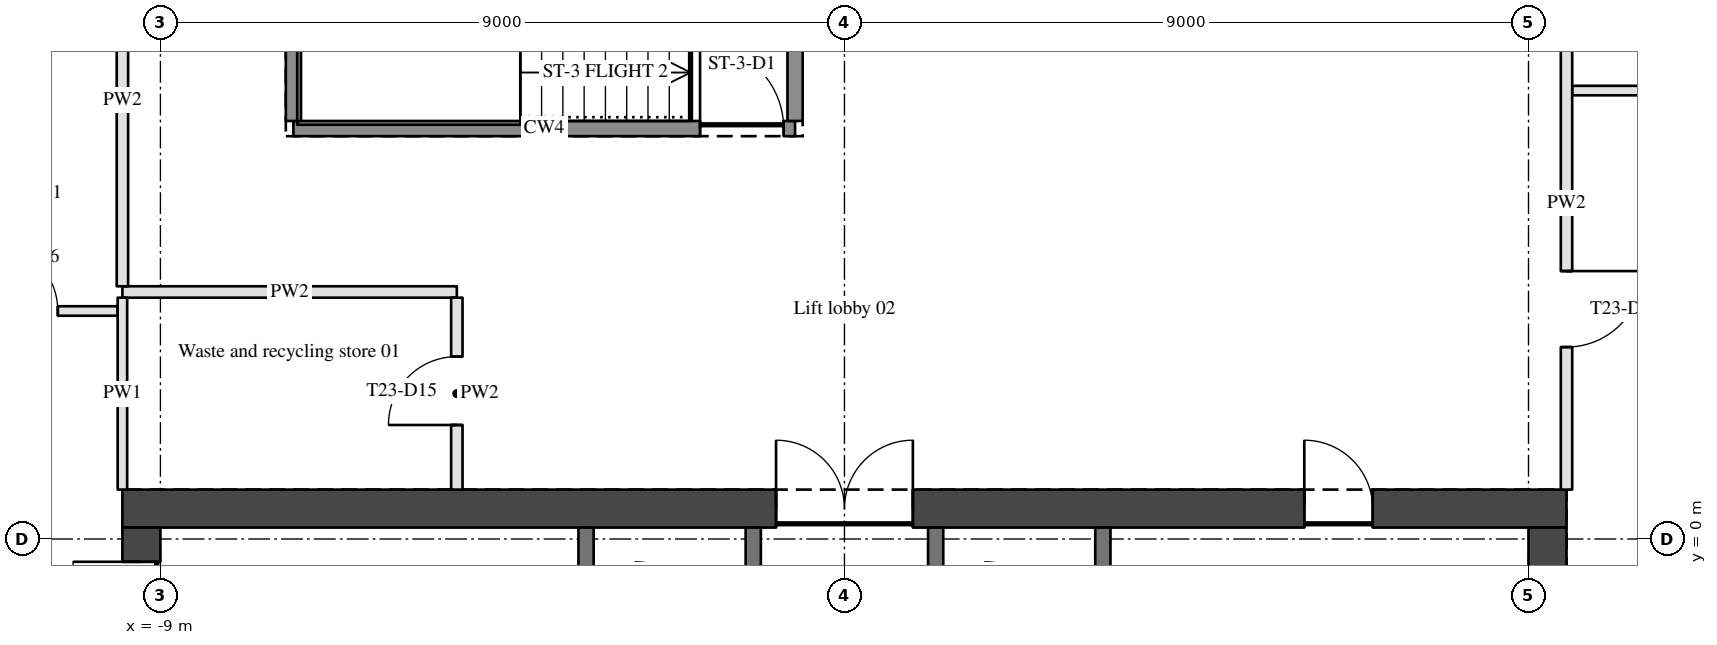
"""IFC4 building model, lengths in metres.
Left out: names, types, materials, properties, quantities, classifications, styles, units other than length and angle.
Written with IfcOpenShell. Run it as: python <this file> out.ifc"""

import sys

from ifc_helpers import new_model, si_unit, direction, frame, frame_2d, origin, place, context, subcontext, project, spatial, rectangle, extrude, element, fill, save


model = new_model("IFC4")
c1 = context("Model", 3, precision=1e-05, world=origin(), true_north=direction((0.0, 1.0)))
c2 = subcontext(c1, "Body", "Model", "MODEL_VIEW")
j1 = project(units=[si_unit("LENGTHUNIT", "METRE"), si_unit("PLANEANGLEUNIT", "RADIAN")], contexts=[c1])
p1 = place(None, origin())
s1 = spatial("IfcSite", under=j1, at=p1, CompositionType="ELEMENT")
p2 = place(p1, origin())
s2 = spatial("IfcBuilding", under=s1, at=p2, CompositionType="ELEMENT")
p3 = place(p2, frame((0.0, 0.0, 294.15)))
s3 = spatial("IfcBuildingStorey", under=s2, at=p3, CompositionType="ELEMENT", Elevation=294.15)
p4 = place(p3, frame((-9.5, 0.4, 0.0), z_axis=(0.0, 0.0, 1.0), x_axis=(1.0, 0.0, 0.0)))
e1 = element("IfcWall", 1, at=p4, inside=s3, PredefinedType="SHEAR", context=c2, shape_type="SweptSolid", body=[
    extrude(rectangle(XDim=19.0, YDim=0.5, at=frame_2d((9.5, 0.0))), origin(), (0.0, 0.0, 1.0), 3.15),
])
p5 = place(p4, frame((8.6, 0.0, 0.0)))
e2 = element("IfcOpeningElement", 2, at=p5, cuts=e1, PredefinedType="OPENING", context=c2, shape_type="SweptSolid", body=[
    extrude(rectangle(XDim=1.8, YDim=2.1, at=frame_2d((0.9, 1.05))), frame((0.0, 0.26, 0.0), z_axis=(0.0, -1.0, 0.0), x_axis=(1.0, 0.0, 0.0)), (0.0, 0.0, 1.0), 0.52),
])
p6 = place(p4, frame((15.55, 0.0, 0.0)))
e3 = element("IfcOpeningElement", 3, at=p6, cuts=e1, PredefinedType="OPENING", context=c2, shape_type="SweptSolid", body=[
    extrude(rectangle(XDim=0.9, YDim=2.1, at=frame_2d((0.45, 1.05))), frame((0.0, 0.26, 0.0), z_axis=(0.0, -1.0, 0.0), x_axis=(1.0, 0.0, 0.0)), (0.0, 0.0, 1.0), 0.52),
])
p7 = place(p3, frame((-9.25, -11.5, 0.0), z_axis=(0.0, 0.0, 1.0), x_axis=(0.0, 1.0, 0.0)))
e4 = element("IfcWall", 4, at=p7, inside=s3, PredefinedType="SHEAR", context=c2, shape_type="SweptSolid", body=[
    extrude(rectangle(XDim=11.65, YDim=0.5, at=frame_2d((5.825, 0.0))), origin(), (0.0, 0.0, 1.0), 3.15),
])
p8 = place(p7, frame((9.4, 0.0, 0.0)))
e5 = element("IfcOpeningElement", 5, at=p8, cuts=e4, PredefinedType="OPENING", context=c2, shape_type="SweptSolid", body=[
    extrude(rectangle(XDim=1.8, YDim=2.1, at=frame_2d((0.9, 1.05))), frame((0.0, 0.26, 0.0), z_axis=(0.0, -1.0, 0.0), x_axis=(1.0, 0.0, 0.0)), (0.0, 0.0, 1.0), 0.52),
])
p9 = place(p3, frame((9.25, -11.5, 0.0), z_axis=(0.0, 0.0, 1.0), x_axis=(0.0, 1.0, 0.0)))
e6 = element("IfcWall", 6, at=p9, inside=s3, PredefinedType="SHEAR", context=c2, shape_type="SweptSolid", body=[
    extrude(rectangle(XDim=11.65, YDim=0.5, at=frame_2d((5.825, 0.0))), origin(), (0.0, 0.0, 1.0), 3.15),
])
p10 = place(p3, frame((-12.1, 3.0, 0.0), z_axis=(0.0, 0.0, 1.0), x_axis=(1.0, 0.0, 0.0)))
e7 = element("IfcWall", 7, at=p10, inside=s3, PredefinedType="PARTITIONING", context=c2, shape_type="SweptSolid", body=[
    extrude(rectangle(XDim=2.538, YDim=0.125, at=frame_2d((1.269, 0.0))), origin(), (0.0, 0.0, 1.0), 2.21),
])
p11 = place(p10, frame((0.85, 0.0, 0.0)))
e8 = element("IfcOpeningElement", 8, at=p11, cuts=e7, PredefinedType="OPENING", context=c2, shape_type="SweptSolid", body=[
    extrude(rectangle(XDim=0.9, YDim=2.1, at=frame_2d((0.45, 1.05))), frame((0.0, 0.073, 0.0), z_axis=(0.0, -1.0, 0.0), x_axis=(1.0, 0.0, 0.0)), (0.0, 0.0, 1.0), 0.145),
])
p12 = place(p3, frame((-9.5, 3.25, 0.0), z_axis=(0.0, 0.0, 1.0), x_axis=(1.0, 0.0, 0.0)))
e9 = element("IfcWall", 9, at=p12, inside=s3, PredefinedType="PARTITIONING", context=c2, shape_type="SweptSolid", body=[
    extrude(rectangle(XDim=4.4, YDim=0.15, at=frame_2d((2.2, 0.0))), origin(), (0.0, 0.0, 1.0), 2.21),
])
p13 = place(p3, frame((-7.25, 5.4, 0.0), z_axis=(0.0, 0.0, 1.0), x_axis=(1.0, 0.0, 0.0)))
e10 = element("IfcWall", 10, at=p13, inside=s3, PredefinedType="SHEAR", context=c2, shape_type="SweptSolid", body=[
    extrude(rectangle(XDim=6.6, YDim=0.2, at=frame_2d((3.3, 0.0))), origin(), (0.0, 0.0, 1.0), 3.15),
])
p14 = place(p13, frame((5.35, 0.0, 0.0)))
e11 = element("IfcOpeningElement", 11, at=p14, cuts=e10, PredefinedType="OPENING", context=c2, shape_type="SweptSolid", body=[
    extrude(rectangle(XDim=1.1, YDim=2.1, at=frame_2d((0.55, 1.05))), frame((0.0, 0.11, 0.0), z_axis=(0.0, -1.0, 0.0), x_axis=(1.0, 0.0, 0.0)), (0.0, 0.0, 1.0), 0.22),
])
p15 = place(p3, frame((9.575, 5.9, 0.0), z_axis=(0.0, 0.0, 1.0), x_axis=(1.0, 0.0, 0.0)))
e12 = element("IfcWall", 12, at=p15, inside=s3, PredefinedType="PARTITIONING", context=c2, shape_type="SweptSolid", body=[
    extrude(rectangle(XDim=2.925, YDim=0.125, at=frame_2d((1.462, 0.0))), origin(), (0.0, 0.0, 1.0), 2.21),
])
p16 = place(p15, frame((0.975, 0.0, 0.0)))
e13 = element("IfcOpeningElement", 13, at=p16, cuts=e12, PredefinedType="OPENING", context=c2, shape_type="SweptSolid", body=[
    extrude(rectangle(XDim=0.9, YDim=2.1, at=frame_2d((0.45, 1.05))), frame((0.0, 0.073, 0.0), z_axis=(0.0, -1.0, 0.0), x_axis=(1.0, 0.0, 0.0)), (0.0, 0.0, 1.0), 0.145),
])
p17 = place(p3, frame((-9.5, 0.65, 0.0), z_axis=(0.0, 0.0, 1.0), x_axis=(0.0, 1.0, 0.0)))
e14 = element("IfcWall", 14, at=p17, inside=s3, PredefinedType="PARTITIONING", context=c2, shape_type="SweptSolid", body=[
    extrude(rectangle(XDim=2.525, YDim=0.125, at=frame_2d((1.263, 0.0))), origin(), (0.0, 0.0, 1.0), 2.21),
])
p18 = place(p3, frame((-9.5, 3.325, 0.0), z_axis=(0.0, 0.0, 1.0), x_axis=(0.0, 1.0, 0.0)))
e15 = element("IfcWall", 15, at=p18, inside=s3, PredefinedType="PARTITIONING", context=c2, shape_type="SweptSolid", body=[
    extrude(rectangle(XDim=4.9, YDim=0.15, at=frame_2d((2.45, 0.0))), origin(), (0.0, 0.0, 1.0), 2.21),
])
p19 = place(p3, frame((-7.25, 5.5, 0.0), z_axis=(0.0, 0.0, 1.0), x_axis=(0.0, 1.0, 0.0)))
e16 = element("IfcWall", 16, at=p19, inside=s3, PredefinedType="SHEAR", context=c2, shape_type="SweptSolid", body=[
    extrude(rectangle(XDim=2.7, YDim=0.2, at=frame_2d((1.35, 0.0))), origin(), (0.0, 0.0, 1.0), 3.15),
])
p20 = place(p3, frame((-5.1, 0.65, 0.0), z_axis=(0.0, 0.0, 1.0), x_axis=(0.0, 1.0, 0.0)))
e17 = element("IfcWall", 17, at=p20, inside=s3, PredefinedType="PARTITIONING", context=c2, shape_type="SweptSolid", body=[
    extrude(rectangle(XDim=2.525, YDim=0.15, at=frame_2d((1.263, 0.0))), origin(), (0.0, 0.0, 1.0), 2.21),
])
p21 = place(p20, frame((0.85, 0.0, 0.0)))
e18 = element("IfcOpeningElement", 18, at=p21, cuts=e17, PredefinedType="OPENING", context=c2, shape_type="SweptSolid", body=[
    extrude(rectangle(XDim=0.9, YDim=2.1, at=frame_2d((0.45, 1.05))), frame((0.0, 0.085, 0.0), z_axis=(0.0, -1.0, 0.0), x_axis=(1.0, 0.0, 0.0)), (0.0, 0.0, 1.0), 0.17),
])
for number, where, z_axis, x_axis in (
    (19, (-3.4, -1.1, 0.0), (0.0, 0.0, 1.0), (0.0, 1.0, 0.0)),
    (20, (-1.2, -1.1, 0.0), (0.0, 0.0, 1.0), (0.0, 1.0, 0.0)),
):
    element("IfcWall", number, at=place(p3, frame(where, z_axis=z_axis, x_axis=x_axis)), inside=s3, PredefinedType="SOLIDWALL", context=c2, shape_type="SweptSolid", body=[
        extrude(rectangle(XDim=1.25, YDim=0.2, at=frame_2d((0.625, 0.0))), origin(), (0.0, 0.0, 1.0), 2.85),
    ])
p22 = place(p3, frame((-0.65, 5.5, 0.0), z_axis=(0.0, 0.0, 1.0), x_axis=(0.0, 1.0, 0.0)))
e21 = element("IfcWall", 21, at=p22, inside=s3, PredefinedType="SHEAR", context=c2, shape_type="SweptSolid", body=[
    extrude(rectangle(XDim=2.7, YDim=0.2, at=frame_2d((1.35, 0.0))), origin(), (0.0, 0.0, 1.0), 3.15),
])
for number, where, z_axis, x_axis in (
    (22, (1.2, -1.1, 0.0), (0.0, 0.0, 1.0), (0.0, 1.0, 0.0)),
    (23, (3.4, -1.1, 0.0), (0.0, 0.0, 1.0), (0.0, 1.0, 0.0)),
):
    element("IfcWall", number, at=place(p3, frame(where, z_axis=z_axis, x_axis=x_axis)), inside=s3, PredefinedType="SOLIDWALL", context=c2, shape_type="SweptSolid", body=[
        extrude(rectangle(XDim=1.25, YDim=0.2, at=frame_2d((0.625, 0.0))), origin(), (0.0, 0.0, 1.0), 2.85),
    ])
p23 = place(p3, frame((9.5, 8.2, 0.0), z_axis=(0.0, 0.0, 1.0), x_axis=(0.0, -1.0, 0.0)))
e24 = element("IfcWall", 24, at=p23, inside=s3, PredefinedType="PARTITIONING", context=c2, shape_type="SweptSolid", body=[
    extrude(rectangle(XDim=7.55, YDim=0.15, at=frame_2d((3.775, 0.0))), origin(), (0.0, 0.0, 1.0), 2.21),
])
p24 = place(p23, frame((4.675, 0.0, 0.0)))
e25 = element("IfcOpeningElement", 25, at=p24, cuts=e24, PredefinedType="OPENING", context=c2, shape_type="SweptSolid", body=[
    extrude(rectangle(XDim=1.0, YDim=2.1, at=frame_2d((0.5, 1.05))), frame((0.0, 0.085, 0.0), z_axis=(0.0, -1.0, 0.0), x_axis=(1.0, 0.0, 0.0)), (0.0, 0.0, 1.0), 0.17),
])
p25 = place(p24, origin())
e26 = element("IfcDoor", 26, at=p25, inside=s3, OperationType="SINGLE_SWING_LEFT", PredefinedType="DOOR", context=c2, shape_type="SweptSolid", body=[
    extrude(rectangle(XDim=1.0, YDim=2.1, at=frame_2d((0.5, 1.05))), frame((0.0, 0.025, 0.0), z_axis=(0.0, -1.0, 0.0), x_axis=(1.0, 0.0, 0.0)), (0.0, 0.0, 1.0), 0.05),
])
fill(e25, e26)
p26 = place(p5, origin())
e27 = element("IfcDoor", 27, at=p26, inside=s3, OperationType="DOUBLE_DOOR_SINGLE_SWING", PredefinedType="DOOR", context=c2, shape_type="SweptSolid", body=[
    extrude(rectangle(XDim=1.8, YDim=2.1, at=frame_2d((0.9, 1.05))), frame((0.0, 0.025, 0.0), z_axis=(0.0, -1.0, 0.0), x_axis=(1.0, 0.0, 0.0)), (0.0, 0.0, 1.0), 0.05),
])
fill(e2, e27)
p27 = place(p8, origin())
e28 = element("IfcDoor", 28, at=p27, inside=s3, OperationType="DOUBLE_DOOR_SINGLE_SWING", PredefinedType="DOOR", context=c2, shape_type="SweptSolid", body=[
    extrude(rectangle(XDim=1.8, YDim=2.1, at=frame_2d((0.9, 1.05))), frame((0.0, 0.025, 0.0), z_axis=(0.0, -1.0, 0.0), x_axis=(1.0, 0.0, 0.0)), (0.0, 0.0, 1.0), 0.05),
])
fill(e5, e28)
p28 = place(p14, origin())
e29 = element("IfcDoor", 29, at=p28, inside=s3, OperationType="SINGLE_SWING_LEFT", PredefinedType="DOOR", context=c2, shape_type="SweptSolid", body=[
    extrude(rectangle(XDim=1.1, YDim=2.1, at=frame_2d((0.55, 1.05))), frame((0.0, 0.025, 0.0), z_axis=(0.0, -1.0, 0.0), x_axis=(1.0, 0.0, 0.0)), (0.0, 0.0, 1.0), 0.05),
])
fill(e11, e29)
p29 = place(p6, origin())
e30 = element("IfcDoor", 30, at=p29, inside=s3, OperationType="SINGLE_SWING_LEFT", PredefinedType="DOOR", context=c2, shape_type="SweptSolid", body=[
    extrude(rectangle(XDim=0.9, YDim=2.1, at=frame_2d((0.45, 1.05))), frame((0.0, 0.025, 0.0), z_axis=(0.0, -1.0, 0.0), x_axis=(1.0, 0.0, 0.0)), (0.0, 0.0, 1.0), 0.05),
])
fill(e3, e30)
p30 = place(p21, origin())
e31 = element("IfcDoor", 31, at=p30, inside=s3, OperationType="SINGLE_SWING_LEFT", PredefinedType="DOOR", context=c2, shape_type="SweptSolid", body=[
    extrude(rectangle(XDim=0.9, YDim=2.1, at=frame_2d((0.45, 1.05))), frame((0.0, 0.025, 0.0), z_axis=(0.0, -1.0, 0.0), x_axis=(1.0, 0.0, 0.0)), (0.0, 0.0, 1.0), 0.05),
])
fill(e18, e31)
p31 = place(p11, origin())
e32 = element("IfcDoor", 32, at=p31, inside=s3, OperationType="SINGLE_SWING_LEFT", PredefinedType="DOOR", context=c2, shape_type="SweptSolid", body=[
    extrude(rectangle(XDim=0.9, YDim=2.1, at=frame_2d((0.45, 1.05))), frame((0.0, 0.025, 0.0), z_axis=(0.0, -1.0, 0.0), x_axis=(1.0, 0.0, 0.0)), (0.0, 0.0, 1.0), 0.05),
])
fill(e8, e32)
save(model, sys.argv[1])
